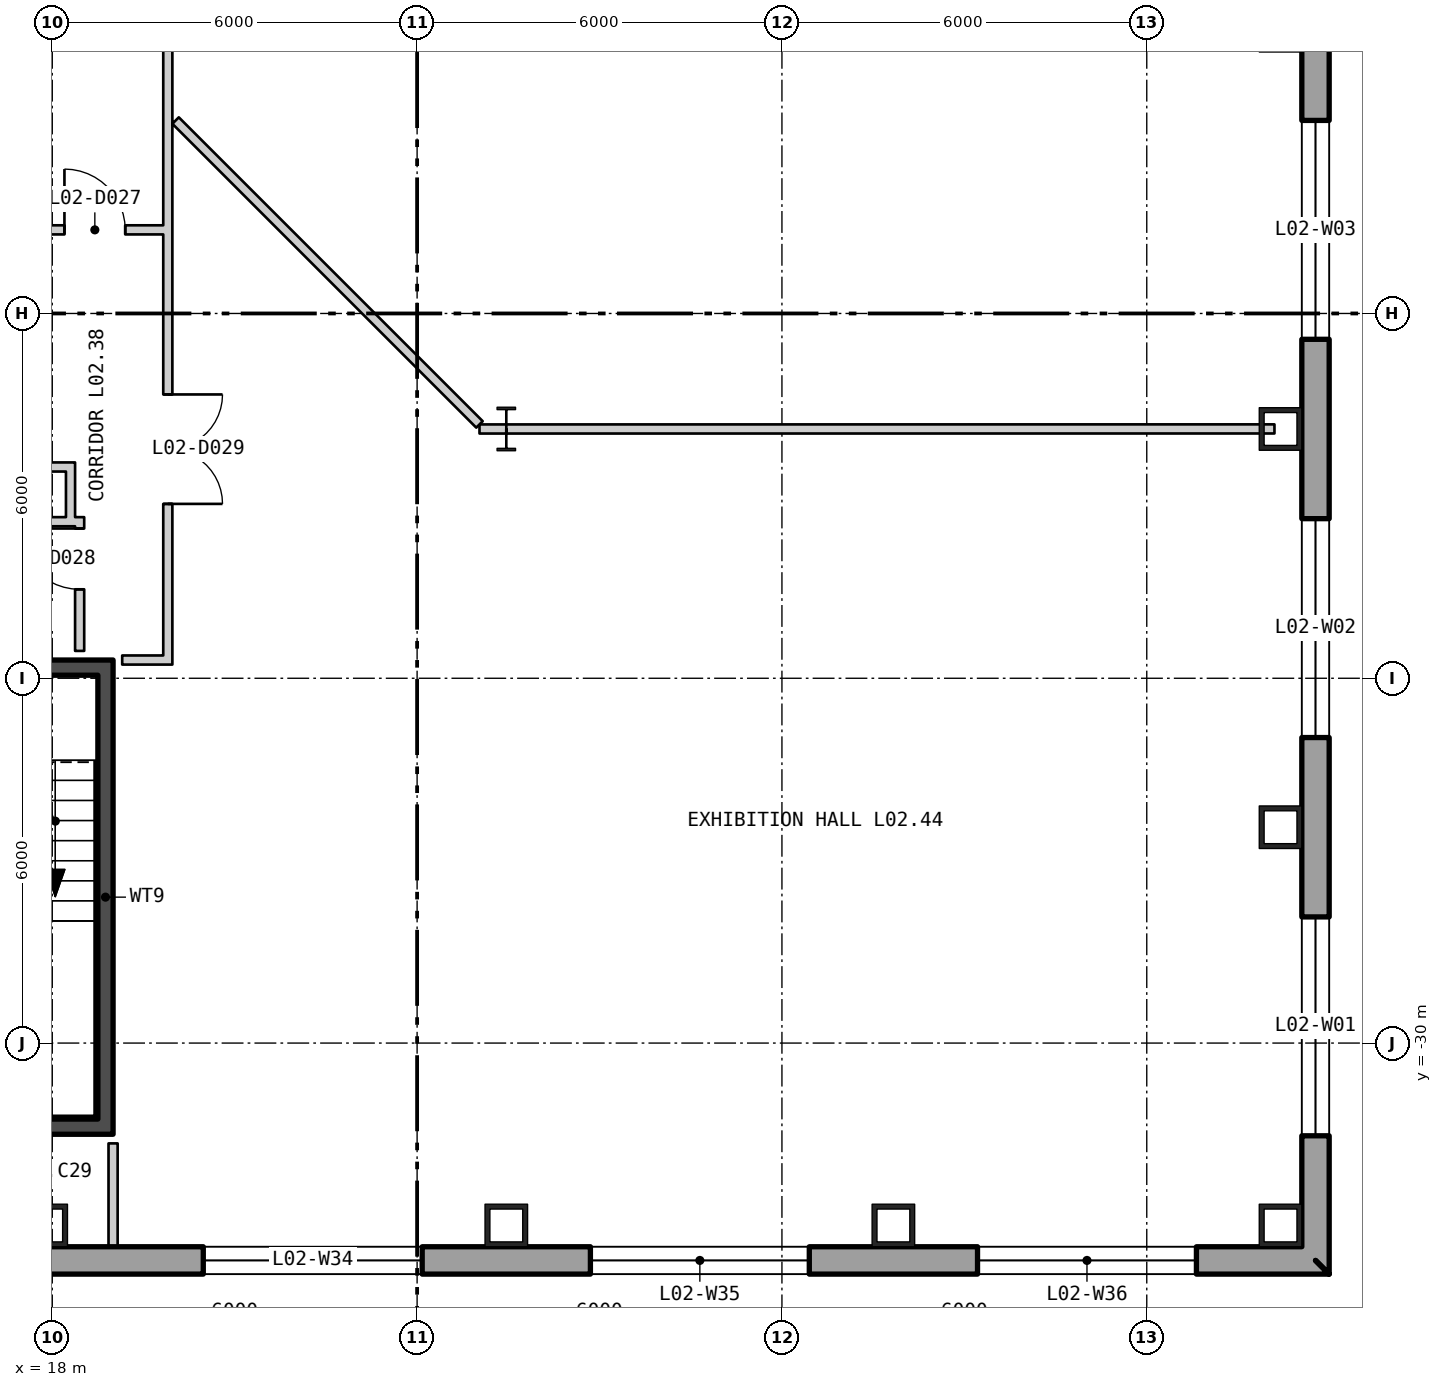
"""IFC4 building model, lengths in metres.
Left out: names, types, materials, properties, quantities, classifications, styles, units other than length and angle.
Written with IfcOpenShell. Run it as: python <this file> out.ifc"""

import sys

from ifc_helpers import new_model, si_unit, direction, frame, frame_2d, origin, origin_2d, place, context, subcontext, project, spatial, polyline, rectangle, hollow_rectangle, i_section, outline, extrude, element, fill, save


model = new_model("IFC4")
c1 = context("Model", 3, precision=1e-05, world=origin(), true_north=direction((0.0, 1.0)))
c2 = subcontext(c1, "Body", "Model", "MODEL_VIEW")
j1 = project(units=[si_unit("LENGTHUNIT", "METRE"), si_unit("PLANEANGLEUNIT", "RADIAN")], contexts=[c1])
p1 = place(None, origin())
s1 = spatial("IfcSite", under=j1, at=p1, CompositionType="ELEMENT")
p2 = place(p1, origin())
s2 = spatial("IfcBuilding", under=s1, at=p2, CompositionType="ELEMENT")
p3 = place(p2, frame((0.0, 0.0, 13.5)))
s3 = spatial("IfcBuildingStorey", under=s2, at=p3, CompositionType="ELEMENT", Elevation=13.5)
for number, where, z_axis, x_axis in (
    (1, (38.2, -33.0, 0.0), (0.0, 0.0, 1.0), (0.0, 1.0, 0.0)),
    (2, (38.2, -26.45, 0.0), (0.0, 0.0, 1.0), (0.0, 1.0, 0.0)),
    (3, (38.2, -19.9, 0.0), (0.0, 0.0, 1.0), (0.0, 1.0, 0.0)),
    (4, (17.9, -33.0, 0.0), (0.0, 0.0, 1.0), (1.0, 0.0, 0.0)),
    (5, (25.467, -33.0, 0.0), (0.0, 0.0, 1.0), (1.0, 0.0, 0.0)),
    (6, (31.833, -33.0, 0.0), (0.0, 0.0, 1.0), (1.0, 0.0, 0.0)),
):
    element("IfcColumn", number, at=place(p3, frame(where, z_axis=z_axis, x_axis=x_axis)), inside=s3, PredefinedType="COLUMN", context=c2, shape_type="SweptSolid", body=[
        extrude(hollow_rectangle(XDim=0.7, YDim=0.7, WallThickness=0.08, at=origin_2d()), origin(), (0.0, 0.0, 1.0), 5.1),
    ])
p4 = place(p3, frame((25.467, -19.9, 0.0), z_axis=(0.0, 0.0, 1.0), x_axis=(1.0, 0.0, 0.0)))
e7 = element("IfcColumn", 7, at=p4, inside=s3, PredefinedType="COLUMN", context=c2, shape_type="SweptSolid", body=[
    extrude(i_section(OverallWidth=0.304, OverallDepth=0.716, WebThickness=0.021, FlangeThickness=0.04, at=origin_2d()), origin(), (0.0, 0.0, 1.0), 5.1),
])
p5 = place(p3, frame((38.775, -33.575, -0.4), z_axis=(0.0, 0.0, 1.0), x_axis=(0.0, 1.0, 0.0)))
e8 = element("IfcWall", 8, at=p5, inside=s3, PredefinedType="SOLIDWALL", context=c2, shape_type="SweptSolid", body=[
    extrude(outline(polyline([(-0.225, -0.225), (53.775, -0.225), (53.325, 0.225), (0.225, 0.225), (-0.225, -0.225)])), origin(), (0.0, 0.0, 1.0), 5.1),
])
p6 = place(p5, frame((2.05, 0.0, 1.3)))
e9 = element("IfcOpeningElement", 9, at=p6, cuts=e8, PredefinedType="OPENING", context=c2, shape_type="SweptSolid", body=[
    extrude(rectangle(XDim=3.6, YDim=3.2, at=frame_2d((1.8, 1.6))), frame((0.0, 0.235, 0.0), z_axis=(0.0, -1.0, 0.0), x_axis=(1.0, 0.0, 0.0)), (0.0, 0.0, 1.0), 0.47),
])
p7 = place(p5, frame((8.6, 0.0, 1.3)))
e10 = element("IfcOpeningElement", 10, at=p7, cuts=e8, PredefinedType="OPENING", context=c2, shape_type="SweptSolid", body=[
    extrude(rectangle(XDim=3.6, YDim=3.2, at=frame_2d((1.8, 1.6))), frame((0.0, 0.235, 0.0), z_axis=(0.0, -1.0, 0.0), x_axis=(1.0, 0.0, 0.0)), (0.0, 0.0, 1.0), 0.47),
])
p8 = place(p5, frame((15.15, 0.0, 1.3)))
e11 = element("IfcOpeningElement", 11, at=p8, cuts=e8, PredefinedType="OPENING", context=c2, shape_type="SweptSolid", body=[
    extrude(rectangle(XDim=3.6, YDim=3.2, at=frame_2d((1.8, 1.6))), frame((0.0, 0.235, 0.0), z_axis=(0.0, -1.0, 0.0), x_axis=(1.0, 0.0, 0.0)), (0.0, 0.0, 1.0), 0.47),
])
p9 = place(p5, frame((21.7, 0.0, 1.3)))
e12 = element("IfcOpeningElement", 12, at=p9, cuts=e8, PredefinedType="OPENING", context=c2, shape_type="SweptSolid", body=[
    extrude(rectangle(XDim=3.6, YDim=3.2, at=frame_2d((1.8, 1.6))), frame((0.0, 0.235, 0.0), z_axis=(0.0, -1.0, 0.0), x_axis=(1.0, 0.0, 0.0)), (0.0, 0.0, 1.0), 0.47),
])
p10 = place(p5, frame((28.25, 0.0, 1.3)))
e13 = element("IfcOpeningElement", 13, at=p10, cuts=e8, PredefinedType="OPENING", context=c2, shape_type="SweptSolid", body=[
    extrude(rectangle(XDim=3.6, YDim=3.2, at=frame_2d((1.8, 1.6))), frame((0.0, 0.235, 0.0), z_axis=(0.0, -1.0, 0.0), x_axis=(1.0, 0.0, 0.0)), (0.0, 0.0, 1.0), 0.47),
])
p11 = place(p5, frame((34.8, 0.0, 1.3)))
e14 = element("IfcOpeningElement", 14, at=p11, cuts=e8, PredefinedType="OPENING", context=c2, shape_type="SweptSolid", body=[
    extrude(rectangle(XDim=3.6, YDim=3.2, at=frame_2d((1.8, 1.6))), frame((0.0, 0.235, 0.0), z_axis=(0.0, -1.0, 0.0), x_axis=(1.0, 0.0, 0.0)), (0.0, 0.0, 1.0), 0.47),
])
p12 = place(p5, frame((41.35, 0.0, 1.3)))
e15 = element("IfcOpeningElement", 15, at=p12, cuts=e8, PredefinedType="OPENING", context=c2, shape_type="SweptSolid", body=[
    extrude(rectangle(XDim=3.6, YDim=3.2, at=frame_2d((1.8, 1.6))), frame((0.0, 0.235, 0.0), z_axis=(0.0, -1.0, 0.0), x_axis=(1.0, 0.0, 0.0)), (0.0, 0.0, 1.0), 0.47),
])
p13 = place(p5, frame((47.9, 0.0, 1.3)))
e16 = element("IfcOpeningElement", 16, at=p13, cuts=e8, PredefinedType="OPENING", context=c2, shape_type="SweptSolid", body=[
    extrude(rectangle(XDim=3.6, YDim=3.2, at=frame_2d((1.8, 1.6))), frame((0.0, 0.235, 0.0), z_axis=(0.0, -1.0, 0.0), x_axis=(1.0, 0.0, 0.0)), (0.0, 0.0, 1.0), 0.47),
])
p14 = place(p3, frame((-38.775, -33.575, -0.4), z_axis=(0.0, 0.0, 1.0), x_axis=(1.0, 0.0, 0.0)))
e17 = element("IfcWall", 17, at=p14, inside=s3, PredefinedType="SOLIDWALL", context=c2, shape_type="SweptSolid", body=[
    extrude(outline(polyline([(-0.225, -0.225), (77.775, -0.225), (77.325, 0.225), (0.225, 0.225), (-0.225, -0.225)])), origin(), (0.0, 0.0, 1.0), 5.1),
])
p15 = place(p14, frame((1.958, 0.0, 1.3)))
e18 = element("IfcOpeningElement", 18, at=p15, cuts=e17, PredefinedType="OPENING", context=c2, shape_type="SweptSolid", body=[
    extrude(rectangle(XDim=3.6, YDim=3.2, at=frame_2d((1.8, 1.6))), frame((0.0, 0.235, 0.0), z_axis=(0.0, -1.0, 0.0), x_axis=(1.0, 0.0, 0.0)), (0.0, 0.0, 1.0), 0.47),
])
p16 = place(p14, frame((8.325, 0.0, 1.3)))
e19 = element("IfcOpeningElement", 19, at=p16, cuts=e17, PredefinedType="OPENING", context=c2, shape_type="SweptSolid", body=[
    extrude(rectangle(XDim=3.6, YDim=3.2, at=frame_2d((1.8, 1.6))), frame((0.0, 0.235, 0.0), z_axis=(0.0, -1.0, 0.0), x_axis=(1.0, 0.0, 0.0)), (0.0, 0.0, 1.0), 0.47),
])
p17 = place(p14, frame((14.692, 0.0, 1.3)))
e20 = element("IfcOpeningElement", 20, at=p17, cuts=e17, PredefinedType="OPENING", context=c2, shape_type="SweptSolid", body=[
    extrude(rectangle(XDim=3.6, YDim=3.2, at=frame_2d((1.8, 1.6))), frame((0.0, 0.235, 0.0), z_axis=(0.0, -1.0, 0.0), x_axis=(1.0, 0.0, 0.0)), (0.0, 0.0, 1.0), 0.47),
])
p18 = place(p14, frame((21.325, 0.0, 1.3)))
e21 = element("IfcOpeningElement", 21, at=p18, cuts=e17, PredefinedType="OPENING", context=c2, shape_type="SweptSolid", body=[
    extrude(rectangle(XDim=3.6, YDim=3.2, at=frame_2d((1.8, 1.6))), frame((0.0, 0.235, 0.0), z_axis=(0.0, -1.0, 0.0), x_axis=(1.0, 0.0, 0.0)), (0.0, 0.0, 1.0), 0.47),
])
p19 = place(p14, frame((27.425, 0.0, 1.3)))
e22 = element("IfcOpeningElement", 22, at=p19, cuts=e17, PredefinedType="OPENING", context=c2, shape_type="SweptSolid", body=[
    extrude(rectangle(XDim=3.6, YDim=3.2, at=frame_2d((1.8, 1.6))), frame((0.0, 0.235, 0.0), z_axis=(0.0, -1.0, 0.0), x_axis=(1.0, 0.0, 0.0)), (0.0, 0.0, 1.0), 0.47),
])
p20 = place(p14, frame((33.792, 0.0, 1.3)))
e23 = element("IfcOpeningElement", 23, at=p20, cuts=e17, PredefinedType="OPENING", context=c2, shape_type="SweptSolid", body=[
    extrude(rectangle(XDim=3.6, YDim=3.2, at=frame_2d((1.8, 1.6))), frame((0.0, 0.235, 0.0), z_axis=(0.0, -1.0, 0.0), x_axis=(1.0, 0.0, 0.0)), (0.0, 0.0, 1.0), 0.47),
])
p21 = place(p14, frame((40.158, 0.0, 1.3)))
e24 = element("IfcOpeningElement", 24, at=p21, cuts=e17, PredefinedType="OPENING", context=c2, shape_type="SweptSolid", body=[
    extrude(rectangle(XDim=3.6, YDim=3.2, at=frame_2d((1.8, 1.6))), frame((0.0, 0.235, 0.0), z_axis=(0.0, -1.0, 0.0), x_axis=(1.0, 0.0, 0.0)), (0.0, 0.0, 1.0), 0.47),
])
p22 = place(p14, frame((46.525, 0.0, 1.3)))
e25 = element("IfcOpeningElement", 25, at=p22, cuts=e17, PredefinedType="OPENING", context=c2, shape_type="SweptSolid", body=[
    extrude(rectangle(XDim=3.6, YDim=3.2, at=frame_2d((1.8, 1.6))), frame((0.0, 0.235, 0.0), z_axis=(0.0, -1.0, 0.0), x_axis=(1.0, 0.0, 0.0)), (0.0, 0.0, 1.0), 0.47),
])
p23 = place(p14, frame((52.625, 0.0, 1.3)))
e26 = element("IfcOpeningElement", 26, at=p23, cuts=e17, PredefinedType="OPENING", context=c2, shape_type="SweptSolid", body=[
    extrude(rectangle(XDim=3.6, YDim=3.2, at=frame_2d((1.8, 1.6))), frame((0.0, 0.235, 0.0), z_axis=(0.0, -1.0, 0.0), x_axis=(1.0, 0.0, 0.0)), (0.0, 0.0, 1.0), 0.47),
])
p24 = place(p14, frame((59.258, 0.0, 1.3)))
e27 = element("IfcOpeningElement", 27, at=p24, cuts=e17, PredefinedType="OPENING", context=c2, shape_type="SweptSolid", body=[
    extrude(rectangle(XDim=3.6, YDim=3.2, at=frame_2d((1.8, 1.6))), frame((0.0, 0.235, 0.0), z_axis=(0.0, -1.0, 0.0), x_axis=(1.0, 0.0, 0.0)), (0.0, 0.0, 1.0), 0.47),
])
p25 = place(p14, frame((65.625, 0.0, 1.3)))
e28 = element("IfcOpeningElement", 28, at=p25, cuts=e17, PredefinedType="OPENING", context=c2, shape_type="SweptSolid", body=[
    extrude(rectangle(XDim=3.6, YDim=3.2, at=frame_2d((1.8, 1.6))), frame((0.0, 0.235, 0.0), z_axis=(0.0, -1.0, 0.0), x_axis=(1.0, 0.0, 0.0)), (0.0, 0.0, 1.0), 0.47),
])
p26 = place(p14, frame((71.992, 0.0, 1.3)))
e29 = element("IfcOpeningElement", 29, at=p26, cuts=e17, PredefinedType="OPENING", context=c2, shape_type="SweptSolid", body=[
    extrude(rectangle(XDim=3.6, YDim=3.2, at=frame_2d((1.8, 1.6))), frame((0.0, 0.235, 0.0), z_axis=(0.0, -1.0, 0.0), x_axis=(1.0, 0.0, 0.0)), (0.0, 0.0, 1.0), 0.47),
])
p27 = place(p3, frame((18.875, -31.25, 0.0), z_axis=(0.0, 0.0, 1.0), x_axis=(0.0, 1.0, 0.0)))
e30 = element("IfcWall", 30, at=p27, inside=s3, PredefinedType="SHEAR", context=c2, shape_type="SweptSolid", body=[
    extrude(rectangle(XDim=7.3, YDim=0.25, at=frame_2d((3.65, 0.0))), origin(), (0.0, 0.0, 1.0), 4.88),
])
p28 = place(p3, frame((15.5, -31.375, 0.0), z_axis=(0.0, 0.0, 1.0), x_axis=(1.0, 0.0, 0.0)))
e31 = element("IfcWall", 31, at=p28, inside=s3, PredefinedType="SHEAR", context=c2, shape_type="SweptSolid", body=[
    extrude(rectangle(XDim=3.5, YDim=0.25, at=frame_2d((1.75, 0.0))), origin(), (0.0, 0.0, 1.0), 4.88),
])
p29 = place(p3, frame((15.5, -23.825, 0.0), z_axis=(0.0, 0.0, 1.0), x_axis=(1.0, 0.0, 0.0)))
e32 = element("IfcWall", 32, at=p29, inside=s3, PredefinedType="SHEAR", context=c2, shape_type="SweptSolid", body=[
    extrude(rectangle(XDim=3.5, YDim=0.25, at=frame_2d((1.75, 0.0))), origin(), (0.0, 0.0, 1.0), 4.88),
])
p30 = place(p29, frame((1.15, 0.0, 0.0)))
e33 = element("IfcOpeningElement", 33, at=p30, cuts=e32, PredefinedType="OPENING", context=c2, shape_type="SweptSolid", body=[
    extrude(rectangle(XDim=1.2, YDim=2.1, at=frame_2d((0.6, 1.05))), frame((0.0, 0.135, 0.0), z_axis=(0.0, -1.0, 0.0), x_axis=(1.0, 0.0, 0.0)), (0.0, 0.0, 1.0), 0.27),
])
for number, where, z_axis, x_axis in (
    (34, (17.575, -21.425, 0.0), (0.0, 0.0, 1.0), (1.0, 0.0, 0.0)),
    (35, (17.575, -20.525, 0.0), (0.0, 0.0, 1.0), (1.0, 0.0, 0.0)),
):
    element("IfcWall", number, at=place(p3, frame(where, z_axis=z_axis, x_axis=x_axis)), inside=s3, PredefinedType="PARTITIONING", context=c2, shape_type="SweptSolid", body=[
        extrude(rectangle(XDim=0.65, YDim=0.15, at=frame_2d((0.325, 0.0))), origin(), (0.0, 0.0, 1.0), 4.88),
    ])
p31 = place(p3, frame((17.575, -16.625, 0.0), z_axis=(0.0, 0.0, 1.0), x_axis=(1.0, 0.0, 0.0)))
e36 = element("IfcWall", 36, at=p31, inside=s3, PredefinedType="PARTITIONING", context=c2, shape_type="SweptSolid", body=[
    extrude(rectangle(XDim=2.25, YDim=0.15, at=frame_2d((1.125, 0.0))), origin(), (0.0, 0.0, 1.0), 4.88),
])
p32 = place(p31, frame((0.625, 0.0, 0.0)))
e37 = element("IfcOpeningElement", 37, at=p32, cuts=e36, PredefinedType="OPENING", context=c2, shape_type="SweptSolid", body=[
    extrude(rectangle(XDim=1.0, YDim=2.1, at=frame_2d((0.5, 1.05))), frame((0.0, 0.085, 0.0), z_axis=(0.0, -1.0, 0.0), x_axis=(1.0, 0.0, 0.0)), (0.0, 0.0, 1.0), 0.17),
])
p33 = place(p3, frame((18.3, -21.5, 0.0), z_axis=(0.0, 0.0, 1.0), x_axis=(0.0, 1.0, 0.0)))
e38 = element("IfcWall", 38, at=p33, inside=s3, PredefinedType="PARTITIONING", context=c2, shape_type="SweptSolid", body=[
    extrude(rectangle(XDim=1.05, YDim=0.15, at=frame_2d((0.525, 0.0))), origin(), (0.0, 0.0, 1.0), 4.88),
])
p34 = place(p3, frame((18.45, -23.55, 0.0), z_axis=(0.0, 0.0, 1.0), x_axis=(0.0, 1.0, 0.0)))
e39 = element("IfcWall", 39, at=p34, inside=s3, PredefinedType="PARTITIONING", context=c2, shape_type="SweptSolid", body=[
    extrude(rectangle(XDim=2.2, YDim=0.15, at=frame_2d((1.1, 0.0))), origin(), (0.0, 0.0, 1.0), 4.88),
])
p35 = place(p34, frame((1.013, 0.0, 0.0)))
e40 = element("IfcOpeningElement", 40, at=p35, cuts=e39, PredefinedType="OPENING", context=c2, shape_type="SweptSolid", body=[
    extrude(rectangle(XDim=1.0, YDim=2.1, at=frame_2d((0.5, 1.05))), frame((0.0, 0.085, 0.0), z_axis=(0.0, -1.0, 0.0), x_axis=(1.0, 0.0, 0.0)), (0.0, 0.0, 1.0), 0.17),
])
p36 = place(p3, frame((19.0, -33.348, 0.0), z_axis=(0.0, 0.0, 1.0), x_axis=(0.0, 1.0, 0.0)))
e41 = element("IfcWall", 41, at=p36, inside=s3, PredefinedType="PARTITIONING", context=c2, shape_type="SweptSolid", body=[
    extrude(rectangle(XDim=0.448, YDim=0.15, at=frame_2d((0.224, 0.0))), origin(), (0.0, 0.0, 1.0), 4.88),
])
p37 = place(p3, frame((19.0, -32.9, 0.0), z_axis=(0.0, 0.0, 1.0), x_axis=(0.0, 1.0, 0.0)))
e42 = element("IfcWall", 42, at=p37, inside=s3, PredefinedType="PARTITIONING", context=c2, shape_type="SweptSolid", body=[
    extrude(rectangle(XDim=1.25, YDim=0.15, at=frame_2d((0.625, 0.0))), origin(), (0.0, 0.0, 1.0), 4.19),
])
p38 = place(p3, frame((19.15, -23.7, 0.0), z_axis=(0.0, 0.0, 1.0), x_axis=(1.0, 0.0, 0.0)))
e43 = element("IfcWall", 43, at=p38, inside=s3, PredefinedType="PARTITIONING", context=c2, shape_type="SweptSolid", body=[
    extrude(rectangle(XDim=0.675, YDim=0.15, at=frame_2d((0.338, 0.0))), origin(), (0.0, 0.0, 1.0), 4.88),
])
p39 = place(p3, frame((19.9, -23.775, 0.0), z_axis=(0.0, 0.0, 1.0), x_axis=(0.0, 1.0, 0.0)))
e44 = element("IfcWall", 44, at=p39, inside=s3, PredefinedType="PARTITIONING", context=c2, shape_type="SweptSolid", body=[
    extrude(rectangle(XDim=21.187, YDim=0.15, at=frame_2d((10.594, 0.0))), origin(), (0.0, 0.0, 1.0), 4.88),
])
p40 = place(p39, frame((2.643, 0.0, 0.0)))
e45 = element("IfcOpeningElement", 45, at=p40, cuts=e44, PredefinedType="OPENING", context=c2, shape_type="SweptSolid", body=[
    extrude(rectangle(XDim=1.8, YDim=2.1, at=frame_2d((0.9, 1.05))), frame((0.0, 0.085, 0.0), z_axis=(0.0, -1.0, 0.0), x_axis=(1.0, 0.0, 0.0)), (0.0, 0.0, 1.0), 0.17),
])
p41 = place(p39, frame((11.998, 0.0, 0.0)))
e46 = element("IfcOpeningElement", 46, at=p41, cuts=e44, PredefinedType="OPENING", context=c2, shape_type="SweptSolid", body=[
    extrude(rectangle(XDim=1.8, YDim=2.1, at=frame_2d((0.9, 1.05))), frame((0.0, 0.085, 0.0), z_axis=(0.0, -1.0, 0.0), x_axis=(1.0, 0.0, 0.0)), (0.0, 0.0, 1.0), 0.17),
])
p42 = place(p3, frame((20.028, -14.827, 0.0), z_axis=(0.0, 0.0, 1.0), x_axis=(0.707106781187, -0.707106781187, 0.0)))
e47 = element("IfcWall", 47, at=p42, inside=s3, PredefinedType="PARTITIONING", context=c2, shape_type="SweptSolid", body=[
    extrude(rectangle(XDim=7.068, YDim=0.15, at=frame_2d((3.534, 0.0))), origin(), (0.0, 0.0, 1.0), 4.88),
])
p43 = place(p3, frame((25.026, -19.9, 0.0), z_axis=(0.0, 0.0, 1.0), x_axis=(1.0, 0.0, 0.0)))
e48 = element("IfcWall", 48, at=p43, inside=s3, PredefinedType="PARTITIONING", context=c2, shape_type="SweptSolid", body=[
    extrude(rectangle(XDim=0.441, YDim=0.15, at=frame_2d((0.221, 0.0))), origin(), (0.0, 0.0, 1.0), 4.88),
])
p44 = place(p3, frame((25.467, -19.9, 0.0), z_axis=(0.0, 0.0, 1.0), x_axis=(0.999999996867, 7.9157761e-05, 0.0)))
e49 = element("IfcWall", 49, at=p44, inside=s3, PredefinedType="PARTITIONING", context=c2, shape_type="SweptSolid", body=[
    extrude(rectangle(XDim=12.633, YDim=0.15, at=frame_2d((6.316, 0.0))), origin(), (0.0, 0.0, 1.0), 4.09),
])
p45 = place(p6, origin())
e50 = element("IfcWindow", 50, at=p45, inside=s3, PartitioningType="SINGLE_PANEL", PredefinedType="WINDOW", context=c2, shape_type="SweptSolid", body=[
    extrude(rectangle(XDim=3.6, YDim=3.2, at=frame_2d((1.8, 1.6))), frame((0.0, 0.105, 0.0), z_axis=(0.0, -1.0, 0.0), x_axis=(1.0, 0.0, 0.0)), (0.0, 0.0, 1.0), 0.06),
])
fill(e9, e50)
p46 = place(p7, origin())
e51 = element("IfcWindow", 51, at=p46, inside=s3, PartitioningType="SINGLE_PANEL", PredefinedType="WINDOW", context=c2, shape_type="SweptSolid", body=[
    extrude(rectangle(XDim=3.6, YDim=3.2, at=frame_2d((1.8, 1.6))), frame((0.0, 0.105, 0.0), z_axis=(0.0, -1.0, 0.0), x_axis=(1.0, 0.0, 0.0)), (0.0, 0.0, 1.0), 0.06),
])
fill(e10, e51)
p47 = place(p8, origin())
e52 = element("IfcWindow", 52, at=p47, inside=s3, PartitioningType="SINGLE_PANEL", PredefinedType="WINDOW", context=c2, shape_type="SweptSolid", body=[
    extrude(rectangle(XDim=3.6, YDim=3.2, at=frame_2d((1.8, 1.6))), frame((0.0, 0.105, 0.0), z_axis=(0.0, -1.0, 0.0), x_axis=(1.0, 0.0, 0.0)), (0.0, 0.0, 1.0), 0.06),
])
fill(e11, e52)
p48 = place(p24, origin())
e53 = element("IfcWindow", 53, at=p48, inside=s3, PartitioningType="SINGLE_PANEL", PredefinedType="WINDOW", context=c2, shape_type="SweptSolid", body=[
    extrude(rectangle(XDim=3.6, YDim=3.2, at=frame_2d((1.8, 1.6))), frame((0.0, 0.105, 0.0), z_axis=(0.0, -1.0, 0.0), x_axis=(1.0, 0.0, 0.0)), (0.0, 0.0, 1.0), 0.06),
])
fill(e27, e53)
p49 = place(p25, origin())
e54 = element("IfcWindow", 54, at=p49, inside=s3, PartitioningType="SINGLE_PANEL", PredefinedType="WINDOW", context=c2, shape_type="SweptSolid", body=[
    extrude(rectangle(XDim=3.6, YDim=3.2, at=frame_2d((1.8, 1.6))), frame((0.0, 0.105, 0.0), z_axis=(0.0, -1.0, 0.0), x_axis=(1.0, 0.0, 0.0)), (0.0, 0.0, 1.0), 0.06),
])
fill(e28, e54)
p50 = place(p26, origin())
e55 = element("IfcWindow", 55, at=p50, inside=s3, PartitioningType="SINGLE_PANEL", PredefinedType="WINDOW", context=c2, shape_type="SweptSolid", body=[
    extrude(rectangle(XDim=3.6, YDim=3.2, at=frame_2d((1.8, 1.6))), frame((0.0, 0.105, 0.0), z_axis=(0.0, -1.0, 0.0), x_axis=(1.0, 0.0, 0.0)), (0.0, 0.0, 1.0), 0.06),
])
fill(e29, e55)
p51 = place(p32, origin())
e56 = element("IfcDoor", 56, at=p51, inside=s3, OperationType="SINGLE_SWING_RIGHT", PredefinedType="DOOR", context=c2, shape_type="SweptSolid", body=[
    extrude(rectangle(XDim=1.0, YDim=2.1, at=frame_2d((0.5, 1.05))), frame((0.0, 0.025, 0.0), z_axis=(0.0, -1.0, 0.0), x_axis=(1.0, 0.0, 0.0)), (0.0, 0.0, 1.0), 0.05),
])
fill(e37, e56)
p52 = place(p35, origin())
e57 = element("IfcDoor", 57, at=p52, inside=s3, OperationType="SINGLE_SWING_LEFT", PredefinedType="DOOR", context=c2, shape_type="SweptSolid", body=[
    extrude(rectangle(XDim=1.0, YDim=2.1, at=frame_2d((0.5, 1.05))), frame((0.0, 0.025, 0.0), z_axis=(0.0, -1.0, 0.0), x_axis=(1.0, 0.0, 0.0)), (0.0, 0.0, 1.0), 0.05),
])
fill(e40, e57)
p53 = place(p40, origin())
e58 = element("IfcDoor", 58, at=p53, inside=s3, OperationType="DOUBLE_DOOR_SINGLE_SWING", PredefinedType="DOOR", context=c2, shape_type="SweptSolid", body=[
    extrude(rectangle(XDim=1.8, YDim=2.1, at=frame_2d((0.9, 1.05))), frame((0.0, 0.025, 0.0), z_axis=(0.0, -1.0, 0.0), x_axis=(1.0, 0.0, 0.0)), (0.0, 0.0, 1.0), 0.05),
])
fill(e45, e58)
save(model, sys.argv[1])
